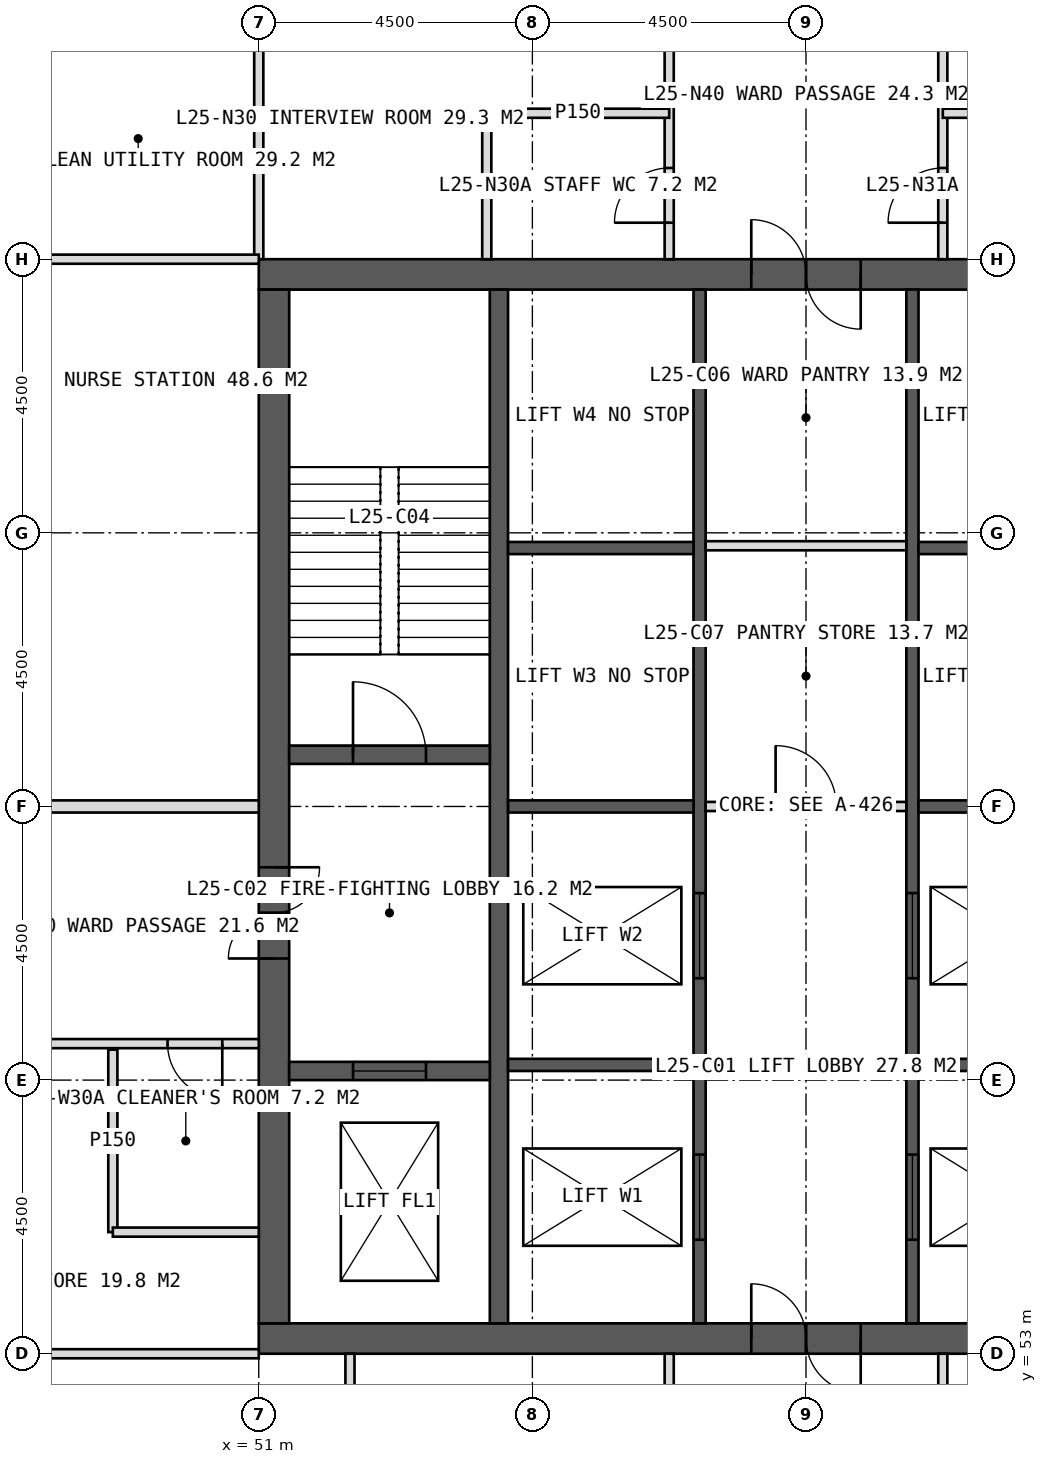
"""IFC4 building model, lengths in metres.
Left out: names, types, materials, properties, quantities, classifications, styles, units other than length and angle.
Written with IfcOpenShell. Run it as: python <this file> out.ifc"""

import sys

from ifc_helpers import new_model, si_unit, direction, frame, frame_2d, origin, place, context, subcontext, project, spatial, rectangle, extrude, element, fill, save


model = new_model("IFC4")
c1 = context("Model", 3, precision=1e-05, world=origin(), true_north=direction((0.0, 1.0)))
c2 = subcontext(c1, "Body", "Model", "MODEL_VIEW")
j1 = project(units=[si_unit("LENGTHUNIT", "METRE"), si_unit("PLANEANGLEUNIT", "RADIAN")], contexts=[c1])
p1 = place(None, origin())
s1 = spatial("IfcSite", under=j1, at=p1, CompositionType="ELEMENT")
p2 = place(p1, origin())
s2 = spatial("IfcBuilding", under=s1, at=p2, CompositionType="ELEMENT")
p3 = place(p2, frame((0.0, 0.0, 108.0)))
s3 = spatial("IfcBuildingStorey", under=s2, at=p3, CompositionType="ELEMENT", Elevation=108.0)
p4 = place(p3, frame((51.0, 70.75, 0.0), z_axis=(0.0, 0.0, 1.0), x_axis=(1.0, 0.0, 0.0)))
e1 = element("IfcWall", 1, at=p4, inside=s3, PredefinedType="SHEAR", context=c2, shape_type="SweptSolid", body=[
    extrude(rectangle(XDim=18.0, YDim=0.5, at=frame_2d((9.0, 0.0))), origin(), (0.0, 0.0, 1.0), 4.0),
])
p5 = place(p4, frame((8.1, 0.0, 0.0)))
e2 = element("IfcOpeningElement", 2, at=p5, cuts=e1, PredefinedType="OPENING", context=c2, shape_type="SweptSolid", body=[
    extrude(rectangle(XDim=1.8, YDim=2.2, at=frame_2d((0.9, 1.1))), frame((0.0, 0.26, 0.0), z_axis=(0.0, -1.0, 0.0), x_axis=(1.0, 0.0, 0.0)), (0.0, 0.0, 1.0), 0.52),
])
p6 = place(p3, frame((51.0, 53.25, 0.0), z_axis=(0.0, 0.0, 1.0), x_axis=(1.0, 0.0, 0.0)))
e3 = element("IfcWall", 3, at=p6, inside=s3, PredefinedType="SHEAR", context=c2, shape_type="SweptSolid", body=[
    extrude(rectangle(XDim=18.0, YDim=0.5, at=frame_2d((9.0, 0.0))), origin(), (0.0, 0.0, 1.0), 4.0),
])
p7 = place(p6, frame((8.1, 0.0, 0.0)))
e4 = element("IfcOpeningElement", 4, at=p7, cuts=e3, PredefinedType="OPENING", context=c2, shape_type="SweptSolid", body=[
    extrude(rectangle(XDim=1.8, YDim=2.2, at=frame_2d((0.9, 1.1))), frame((0.0, 0.26, 0.0), z_axis=(0.0, -1.0, 0.0), x_axis=(1.0, 0.0, 0.0)), (0.0, 0.0, 1.0), 0.52),
])
p8 = place(p3, frame((51.25, 53.5, 0.0), z_axis=(0.0, 0.0, 1.0), x_axis=(0.0, 1.0, 0.0)))
e5 = element("IfcWall", 5, at=p8, inside=s3, PredefinedType="SHEAR", context=c2, shape_type="SweptSolid", body=[
    extrude(rectangle(XDim=17.0, YDim=0.5, at=frame_2d((8.5, 0.0))), origin(), (0.0, 0.0, 1.0), 4.0),
])
p9 = place(p8, frame((6.0, 0.0, 0.0)))
e6 = element("IfcOpeningElement", 6, at=p9, cuts=e5, PredefinedType="OPENING", context=c2, shape_type="SweptSolid", body=[
    extrude(rectangle(XDim=1.5, YDim=2.2, at=frame_2d((0.75, 1.1))), frame((0.0, 0.26, 0.0), z_axis=(0.0, -1.0, 0.0), x_axis=(1.0, 0.0, 0.0)), (0.0, 0.0, 1.0), 0.52),
])
p10 = place(p3, frame((54.95, 53.5, 0.0), z_axis=(0.0, 0.0, 1.0), x_axis=(0.0, 1.0, 0.0)))
e7 = element("IfcWall", 7, at=p10, inside=s3, PredefinedType="SHEAR", context=c2, shape_type="SweptSolid", body=[
    extrude(rectangle(XDim=17.0, YDim=0.3, at=frame_2d((8.5, 0.0))), origin(), (0.0, 0.0, 1.0), 4.0),
])
p11 = place(p3, frame((58.25, 53.5, 0.0), z_axis=(0.0, 0.0, 1.0), x_axis=(0.0, 1.0, 0.0)))
e8 = element("IfcWall", 8, at=p11, inside=s3, PredefinedType="SHEAR", context=c2, shape_type="SweptSolid", body=[
    extrude(rectangle(XDim=17.0, YDim=0.2, at=frame_2d((8.5, 0.0))), origin(), (0.0, 0.0, 1.0), 4.0),
])
p12 = place(p11, frame((1.375, 0.0, 0.0)))
e9 = element("IfcOpeningElement", 9, at=p12, cuts=e8, PredefinedType="OPENING", context=c2, shape_type="SweptSolid", body=[
    extrude(rectangle(XDim=1.4, YDim=2.2, at=frame_2d((0.7, 1.1))), frame((0.0, 0.11, 0.0), z_axis=(0.0, -1.0, 0.0), x_axis=(1.0, 0.0, 0.0)), (0.0, 0.0, 1.0), 0.22),
])
p13 = place(p11, frame((5.675, 0.0, 0.0)))
e10 = element("IfcOpeningElement", 10, at=p13, cuts=e8, PredefinedType="OPENING", context=c2, shape_type="SweptSolid", body=[
    extrude(rectangle(XDim=1.4, YDim=2.2, at=frame_2d((0.7, 1.1))), frame((0.0, 0.11, 0.0), z_axis=(0.0, -1.0, 0.0), x_axis=(1.0, 0.0, 0.0)), (0.0, 0.0, 1.0), 0.22),
])
p14 = place(p3, frame((61.75, 53.5, 0.0), z_axis=(0.0, 0.0, 1.0), x_axis=(0.0, 1.0, 0.0)))
e11 = element("IfcWall", 11, at=p14, inside=s3, PredefinedType="SHEAR", context=c2, shape_type="SweptSolid", body=[
    extrude(rectangle(XDim=17.0, YDim=0.2, at=frame_2d((8.5, 0.0))), origin(), (0.0, 0.0, 1.0), 4.0),
])
p15 = place(p14, frame((1.375, 0.0, 0.0)))
e12 = element("IfcOpeningElement", 12, at=p15, cuts=e11, PredefinedType="OPENING", context=c2, shape_type="SweptSolid", body=[
    extrude(rectangle(XDim=1.4, YDim=2.2, at=frame_2d((0.7, 1.1))), frame((0.0, 0.11, 0.0), z_axis=(0.0, -1.0, 0.0), x_axis=(1.0, 0.0, 0.0)), (0.0, 0.0, 1.0), 0.22),
])
p16 = place(p14, frame((5.675, 0.0, 0.0)))
e13 = element("IfcOpeningElement", 13, at=p16, cuts=e11, PredefinedType="OPENING", context=c2, shape_type="SweptSolid", body=[
    extrude(rectangle(XDim=1.4, YDim=2.2, at=frame_2d((0.7, 1.1))), frame((0.0, 0.11, 0.0), z_axis=(0.0, -1.0, 0.0), x_axis=(1.0, 0.0, 0.0)), (0.0, 0.0, 1.0), 0.22),
])
for number, where, z_axis, x_axis in (
    (14, (55.1, 57.75, 0.0), (0.0, 0.0, 1.0), (1.0, 0.0, 0.0)),
    (15, (61.85, 57.75, 0.0), (0.0, 0.0, 1.0), (1.0, 0.0, 0.0)),
    (16, (55.1, 62.0, 0.0), (0.0, 0.0, 1.0), (1.0, 0.0, 0.0)),
    (17, (61.85, 62.0, 0.0), (0.0, 0.0, 1.0), (1.0, 0.0, 0.0)),
    (18, (55.1, 66.25, 0.0), (0.0, 0.0, 1.0), (1.0, 0.0, 0.0)),
    (19, (61.85, 66.25, 0.0), (0.0, 0.0, 1.0), (1.0, 0.0, 0.0)),
):
    element("IfcWall", number, at=place(p3, frame(where, z_axis=z_axis, x_axis=x_axis)), inside=s3, PredefinedType="SHEAR", context=c2, shape_type="SweptSolid", body=[
        extrude(rectangle(XDim=3.05, YDim=0.2, at=frame_2d((1.525, 0.0))), origin(), (0.0, 0.0, 1.0), 4.0),
    ])
p17 = place(p3, frame((51.5, 62.85, 0.0), z_axis=(0.0, 0.0, 1.0), x_axis=(1.0, 0.0, 0.0)))
e20 = element("IfcWall", 20, at=p17, inside=s3, PredefinedType="SHEAR", context=c2, shape_type="SweptSolid", body=[
    extrude(rectangle(XDim=3.3, YDim=0.3, at=frame_2d((1.65, 0.0))), origin(), (0.0, 0.0, 1.0), 4.0),
])
p18 = place(p17, frame((1.05, 0.0, 0.0)))
e21 = element("IfcOpeningElement", 21, at=p18, cuts=e20, PredefinedType="OPENING", context=c2, shape_type="SweptSolid", body=[
    extrude(rectangle(XDim=1.2, YDim=2.1, at=frame_2d((0.6, 1.05))), frame((0.0, 0.16, 0.0), z_axis=(0.0, -1.0, 0.0), x_axis=(1.0, 0.0, 0.0)), (0.0, 0.0, 1.0), 0.32),
])
p19 = place(p3, frame((51.5, 57.65, 0.0), z_axis=(0.0, 0.0, 1.0), x_axis=(1.0, 0.0, 0.0)))
e22 = element("IfcWall", 22, at=p19, inside=s3, PredefinedType="SHEAR", context=c2, shape_type="SweptSolid", body=[
    extrude(rectangle(XDim=3.3, YDim=0.3, at=frame_2d((1.65, 0.0))), origin(), (0.0, 0.0, 1.0), 4.0),
])
p20 = place(p19, frame((1.05, 0.0, 0.0)))
e23 = element("IfcOpeningElement", 23, at=p20, cuts=e22, PredefinedType="OPENING", context=c2, shape_type="SweptSolid", body=[
    extrude(rectangle(XDim=1.2, YDim=2.2, at=frame_2d((0.6, 1.1))), frame((0.0, 0.16, 0.0), z_axis=(0.0, -1.0, 0.0), x_axis=(1.0, 0.0, 0.0)), (0.0, 0.0, 1.0), 0.32),
])
p21 = place(p3, frame((51.0, 71.0, 0.0), z_axis=(0.0, 0.0, 1.0), x_axis=(0.0, 1.0, 0.0)))
e24 = element("IfcWall", 24, at=p21, inside=s3, PredefinedType="PARTITIONING", context=c2, shape_type="SweptSolid", body=[
    extrude(rectangle(XDim=5.4, YDim=0.15, at=frame_2d((2.7, 0.0))), origin(), (0.0, 0.0, 1.0), 3.75),
])
p22 = place(p3, frame((57.75, 71.0, 0.0), z_axis=(0.0, 0.0, 1.0), x_axis=(0.0, 1.0, 0.0)))
e25 = element("IfcWall", 25, at=p22, inside=s3, PredefinedType="PARTITIONING", context=c2, shape_type="SweptSolid", body=[
    extrude(rectangle(XDim=5.4, YDim=0.15, at=frame_2d((2.7, 0.0))), origin(), (0.0, 0.0, 1.0), 3.75),
])
p23 = place(p22, frame((0.6, 0.0, 0.0)))
e26 = element("IfcOpeningElement", 26, at=p23, cuts=e25, PredefinedType="OPENING", context=c2, shape_type="SweptSolid", body=[
    extrude(rectangle(XDim=0.9, YDim=2.1, at=frame_2d((0.45, 1.05))), frame((0.0, 0.085, 0.0), z_axis=(0.0, -1.0, 0.0), x_axis=(1.0, 0.0, 0.0)), (0.0, 0.0, 1.0), 0.17),
])
p24 = place(p3, frame((62.25, 71.0, 0.0), z_axis=(0.0, 0.0, 1.0), x_axis=(0.0, 1.0, 0.0)))
e27 = element("IfcWall", 27, at=p24, inside=s3, PredefinedType="PARTITIONING", context=c2, shape_type="SweptSolid", body=[
    extrude(rectangle(XDim=5.4, YDim=0.15, at=frame_2d((2.7, 0.0))), origin(), (0.0, 0.0, 1.0), 3.75),
])
p25 = place(p24, frame((0.6, 0.0, 0.0)))
e28 = element("IfcOpeningElement", 28, at=p25, cuts=e27, PredefinedType="OPENING", context=c2, shape_type="SweptSolid", body=[
    extrude(rectangle(XDim=0.9, YDim=2.1, at=frame_2d((0.45, 1.05))), frame((0.0, 0.085, 0.0), z_axis=(0.0, -1.0, 0.0), x_axis=(1.0, 0.0, 0.0)), (0.0, 0.0, 1.0), 0.17),
])
p26 = place(p3, frame((54.75, 73.4, 0.0), z_axis=(0.0, 0.0, 1.0), x_axis=(1.0, 0.0, 0.0)))
e29 = element("IfcWall", 29, at=p26, inside=s3, PredefinedType="PARTITIONING", context=c2, shape_type="SweptSolid", body=[
    extrude(rectangle(XDim=3.0, YDim=0.15, at=frame_2d((1.5, 0.0))), origin(), (0.0, 0.0, 1.0), 3.75),
])
p27 = place(p3, frame((54.75, 71.0, 0.0), z_axis=(0.0, 0.0, 1.0), x_axis=(0.0, 1.0, 0.0)))
e30 = element("IfcWall", 30, at=p27, inside=s3, PredefinedType="PARTITIONING", context=c2, shape_type="SweptSolid", body=[
    extrude(rectangle(XDim=2.4, YDim=0.15, at=frame_2d((1.2, 0.0))), origin(), (0.0, 0.0, 1.0), 3.75),
])
p28 = place(p3, frame((62.25, 73.4, 0.0), z_axis=(0.0, 0.0, 1.0), x_axis=(1.0, 0.0, 0.0)))
e31 = element("IfcWall", 31, at=p28, inside=s3, PredefinedType="PARTITIONING", context=c2, shape_type="SweptSolid", body=[
    extrude(rectangle(XDim=3.0, YDim=0.15, at=frame_2d((1.5, 0.0))), origin(), (0.0, 0.0, 1.0), 3.75),
])
p29 = place(p3, frame((51.0, 53.0, 0.0), z_axis=(0.0, 0.0, 1.0), x_axis=(-1.0, 0.0, 0.0)))
e32 = element("IfcWall", 32, at=p29, inside=s3, PredefinedType="PARTITIONING", context=c2, shape_type="SweptSolid", body=[
    extrude(rectangle(XDim=5.4, YDim=0.15, at=frame_2d((2.7, 0.0))), origin(), (0.0, 0.0, 1.0), 3.75),
])
p30 = place(p3, frame((51.0, 58.1, 0.0), z_axis=(0.0, 0.0, 1.0), x_axis=(-1.0, 0.0, 0.0)))
e33 = element("IfcWall", 33, at=p30, inside=s3, PredefinedType="PARTITIONING", context=c2, shape_type="SweptSolid", body=[
    extrude(rectangle(XDim=5.4, YDim=0.15, at=frame_2d((2.7, 0.0))), origin(), (0.0, 0.0, 1.0), 3.75),
])
p31 = place(p30, frame((0.6, 0.0, 0.0)))
e34 = element("IfcOpeningElement", 34, at=p31, cuts=e33, PredefinedType="OPENING", context=c2, shape_type="SweptSolid", body=[
    extrude(rectangle(XDim=0.9, YDim=2.1, at=frame_2d((0.45, 1.05))), frame((0.0, 0.085, 0.0), z_axis=(0.0, -1.0, 0.0), x_axis=(1.0, 0.0, 0.0)), (0.0, 0.0, 1.0), 0.17),
])
p32 = place(p3, frame((51.0, 62.0, 0.0), z_axis=(0.0, 0.0, 1.0), x_axis=(-1.0, 0.0, 0.0)))
e35 = element("IfcWall", 35, at=p32, inside=s3, PredefinedType="SOLIDWALL", context=c2, shape_type="SweptSolid", body=[
    extrude(rectangle(XDim=5.4, YDim=0.2, at=frame_2d((2.7, 0.0))), origin(), (0.0, 0.0, 1.0), 2.95),
])
p33 = place(p3, frame((51.0, 71.0, 0.0), z_axis=(0.0, 0.0, 1.0), x_axis=(-1.0, 0.0, 0.0)))
e36 = element("IfcWall", 36, at=p33, inside=s3, PredefinedType="PARTITIONING", context=c2, shape_type="SweptSolid", body=[
    extrude(rectangle(XDim=5.4, YDim=0.15, at=frame_2d((2.7, 0.0))), origin(), (0.0, 0.0, 1.0), 3.75),
])
p34 = place(p3, frame((48.6, 55.0, 0.0), z_axis=(0.0, 0.0, 1.0), x_axis=(0.0, 1.0, 0.0)))
e37 = element("IfcWall", 37, at=p34, inside=s3, PredefinedType="PARTITIONING", context=c2, shape_type="SweptSolid", body=[
    extrude(rectangle(XDim=3.0, YDim=0.15, at=frame_2d((1.5, 0.0))), origin(), (0.0, 0.0, 1.0), 3.75),
])
p35 = place(p3, frame((51.0, 55.0, 0.0), z_axis=(0.0, 0.0, 1.0), x_axis=(-1.0, 0.0, 0.0)))
e38 = element("IfcWall", 38, at=p35, inside=s3, PredefinedType="PARTITIONING", context=c2, shape_type="SweptSolid", body=[
    extrude(rectangle(XDim=2.4, YDim=0.15, at=frame_2d((1.2, 0.0))), origin(), (0.0, 0.0, 1.0), 3.75),
])
for number, where, z_axis, x_axis in (
    (39, (62.25, 53.0, 0.0), (0.0, 0.0, 1.0), (0.0, -1.0, 0.0)),
    (40, (57.75, 53.0, 0.0), (0.0, 0.0, 1.0), (0.0, -1.0, 0.0)),
    (41, (52.5, 53.0, 0.0), (0.0, 0.0, 1.0), (0.0, -1.0, 0.0)),
):
    element("IfcWall", number, at=place(p3, frame(where, z_axis=z_axis, x_axis=x_axis)), inside=s3, PredefinedType="PARTITIONING", context=c2, shape_type="SweptSolid", body=[
        extrude(rectangle(XDim=5.4, YDim=0.15, at=frame_2d((2.7, 0.0))), origin(), (0.0, 0.0, 1.0), 3.75),
    ])
p36 = place(p3, frame((58.35, 62.0, 0.0), z_axis=(0.0, 0.0, 1.0), x_axis=(1.0, 0.0, 0.0)))
e42 = element("IfcWall", 42, at=p36, inside=s3, PredefinedType="PARTITIONING", context=c2, shape_type="SweptSolid", body=[
    extrude(rectangle(XDim=3.3, YDim=0.15, at=frame_2d((1.65, 0.0))), origin(), (0.0, 0.0, 1.0), 3.75),
])
p37 = place(p36, frame((1.15, 0.0, 0.0)))
e43 = element("IfcOpeningElement", 43, at=p37, cuts=e42, PredefinedType="OPENING", context=c2, shape_type="SweptSolid", body=[
    extrude(rectangle(XDim=1.0, YDim=2.1, at=frame_2d((0.5, 1.05))), frame((0.0, 0.085, 0.0), z_axis=(0.0, -1.0, 0.0), x_axis=(1.0, 0.0, 0.0)), (0.0, 0.0, 1.0), 0.17),
])
p38 = place(p3, frame((58.35, 66.288, 0.0), z_axis=(0.0, 0.0, 1.0), x_axis=(1.0, 0.0, 0.0)))
e44 = element("IfcWall", 44, at=p38, inside=s3, PredefinedType="PARTITIONING", context=c2, shape_type="SweptSolid", body=[
    extrude(rectangle(XDim=3.3, YDim=0.15, at=frame_2d((1.65, 0.0))), origin(), (0.0, 0.0, 1.0), 3.75),
])
p39 = place(p23, origin())
e45 = element("IfcDoor", 45, at=p39, inside=s3, OperationType="SINGLE_SWING_LEFT", PredefinedType="DOOR", context=c2, shape_type="SweptSolid", body=[
    extrude(rectangle(XDim=0.9, YDim=2.1, at=frame_2d((0.45, 1.05))), frame((0.0, 0.025, 0.0), z_axis=(0.0, -1.0, 0.0), x_axis=(1.0, 0.0, 0.0)), (0.0, 0.0, 1.0), 0.05),
])
fill(e26, e45)
p40 = place(p25, origin())
e46 = element("IfcDoor", 46, at=p40, inside=s3, OperationType="SINGLE_SWING_LEFT", PredefinedType="DOOR", context=c2, shape_type="SweptSolid", body=[
    extrude(rectangle(XDim=0.9, YDim=2.1, at=frame_2d((0.45, 1.05))), frame((0.0, 0.025, 0.0), z_axis=(0.0, -1.0, 0.0), x_axis=(1.0, 0.0, 0.0)), (0.0, 0.0, 1.0), 0.05),
])
fill(e28, e46)
p41 = place(p31, origin())
e47 = element("IfcDoor", 47, at=p41, inside=s3, OperationType="SINGLE_SWING_LEFT", PredefinedType="DOOR", context=c2, shape_type="SweptSolid", body=[
    extrude(rectangle(XDim=0.9, YDim=2.1, at=frame_2d((0.45, 1.05))), frame((0.0, 0.025, 0.0), z_axis=(0.0, -1.0, 0.0), x_axis=(1.0, 0.0, 0.0)), (0.0, 0.0, 1.0), 0.05),
])
fill(e34, e47)
p42 = place(p7, origin())
e48 = element("IfcDoor", 48, at=p42, inside=s3, OperationType="DOUBLE_DOOR_SINGLE_SWING", PredefinedType="DOOR", context=c2, shape_type="SweptSolid", body=[
    extrude(rectangle(XDim=1.8, YDim=2.2, at=frame_2d((0.9, 1.1))), frame((0.0, 0.025, 0.0), z_axis=(0.0, -1.0, 0.0), x_axis=(1.0, 0.0, 0.0)), (0.0, 0.0, 1.0), 0.05),
])
fill(e4, e48)
p43 = place(p9, origin())
e49 = element("IfcDoor", 49, at=p43, inside=s3, OperationType="DOUBLE_DOOR_SINGLE_SWING", PredefinedType="DOOR", context=c2, shape_type="SweptSolid", body=[
    extrude(rectangle(XDim=1.5, YDim=2.2, at=frame_2d((0.75, 1.1))), frame((0.0, 0.025, 0.0), z_axis=(0.0, -1.0, 0.0), x_axis=(1.0, 0.0, 0.0)), (0.0, 0.0, 1.0), 0.05),
])
fill(e6, e49)
p44 = place(p18, origin())
e50 = element("IfcDoor", 50, at=p44, inside=s3, OperationType="SINGLE_SWING_LEFT", PredefinedType="DOOR", context=c2, shape_type="SweptSolid", body=[
    extrude(rectangle(XDim=1.2, YDim=2.1, at=frame_2d((0.6, 1.05))), frame((0.0, 0.025, 0.0), z_axis=(0.0, -1.0, 0.0), x_axis=(1.0, 0.0, 0.0)), (0.0, 0.0, 1.0), 0.05),
])
fill(e21, e50)
p45 = place(p20, origin())
e51 = element("IfcDoor", 51, at=p45, inside=s3, OperationType="SLIDING_TO_LEFT", PredefinedType="DOOR", context=c2, shape_type="SweptSolid", body=[
    extrude(rectangle(XDim=1.2, YDim=2.2, at=frame_2d((0.6, 1.1))), frame((0.0, 0.025, 0.0), z_axis=(0.0, -1.0, 0.0), x_axis=(1.0, 0.0, 0.0)), (0.0, 0.0, 1.0), 0.05),
])
fill(e23, e51)
p46 = place(p12, origin())
e52 = element("IfcDoor", 52, at=p46, inside=s3, OperationType="SLIDING_TO_LEFT", PredefinedType="DOOR", context=c2, shape_type="SweptSolid", body=[
    extrude(rectangle(XDim=1.4, YDim=2.2, at=frame_2d((0.7, 1.1))), frame((0.0, 0.025, 0.0), z_axis=(0.0, -1.0, 0.0), x_axis=(1.0, 0.0, 0.0)), (0.0, 0.0, 1.0), 0.05),
])
fill(e9, e52)
p47 = place(p15, origin())
e53 = element("IfcDoor", 53, at=p47, inside=s3, OperationType="SLIDING_TO_LEFT", PredefinedType="DOOR", context=c2, shape_type="SweptSolid", body=[
    extrude(rectangle(XDim=1.4, YDim=2.2, at=frame_2d((0.7, 1.1))), frame((0.0, 0.025, 0.0), z_axis=(0.0, -1.0, 0.0), x_axis=(1.0, 0.0, 0.0)), (0.0, 0.0, 1.0), 0.05),
])
fill(e12, e53)
p48 = place(p13, origin())
e54 = element("IfcDoor", 54, at=p48, inside=s3, OperationType="SLIDING_TO_LEFT", PredefinedType="DOOR", context=c2, shape_type="SweptSolid", body=[
    extrude(rectangle(XDim=1.4, YDim=2.2, at=frame_2d((0.7, 1.1))), frame((0.0, 0.025, 0.0), z_axis=(0.0, -1.0, 0.0), x_axis=(1.0, 0.0, 0.0)), (0.0, 0.0, 1.0), 0.05),
])
fill(e10, e54)
p49 = place(p16, origin())
e55 = element("IfcDoor", 55, at=p49, inside=s3, OperationType="SLIDING_TO_LEFT", PredefinedType="DOOR", context=c2, shape_type="SweptSolid", body=[
    extrude(rectangle(XDim=1.4, YDim=2.2, at=frame_2d((0.7, 1.1))), frame((0.0, 0.025, 0.0), z_axis=(0.0, -1.0, 0.0), x_axis=(1.0, 0.0, 0.0)), (0.0, 0.0, 1.0), 0.05),
])
fill(e13, e55)
p50 = place(p37, origin())
e56 = element("IfcDoor", 56, at=p50, inside=s3, OperationType="SINGLE_SWING_LEFT", PredefinedType="DOOR", context=c2, shape_type="SweptSolid", body=[
    extrude(rectangle(XDim=1.0, YDim=2.1, at=frame_2d((0.5, 1.05))), frame((0.0, 0.025, 0.0), z_axis=(0.0, -1.0, 0.0), x_axis=(1.0, 0.0, 0.0)), (0.0, 0.0, 1.0), 0.05),
])
fill(e43, e56)
p51 = place(p5, origin())
e57 = element("IfcDoor", 57, at=p51, inside=s3, OperationType="DOUBLE_DOOR_SINGLE_SWING", PredefinedType="DOOR", context=c2, shape_type="SweptSolid", body=[
    extrude(rectangle(XDim=1.8, YDim=2.2, at=frame_2d((0.9, 1.1))), frame((0.0, 0.025, 0.0), z_axis=(0.0, -1.0, 0.0), x_axis=(1.0, 0.0, 0.0)), (0.0, 0.0, 1.0), 0.05),
])
fill(e2, e57)
save(model, sys.argv[1])
